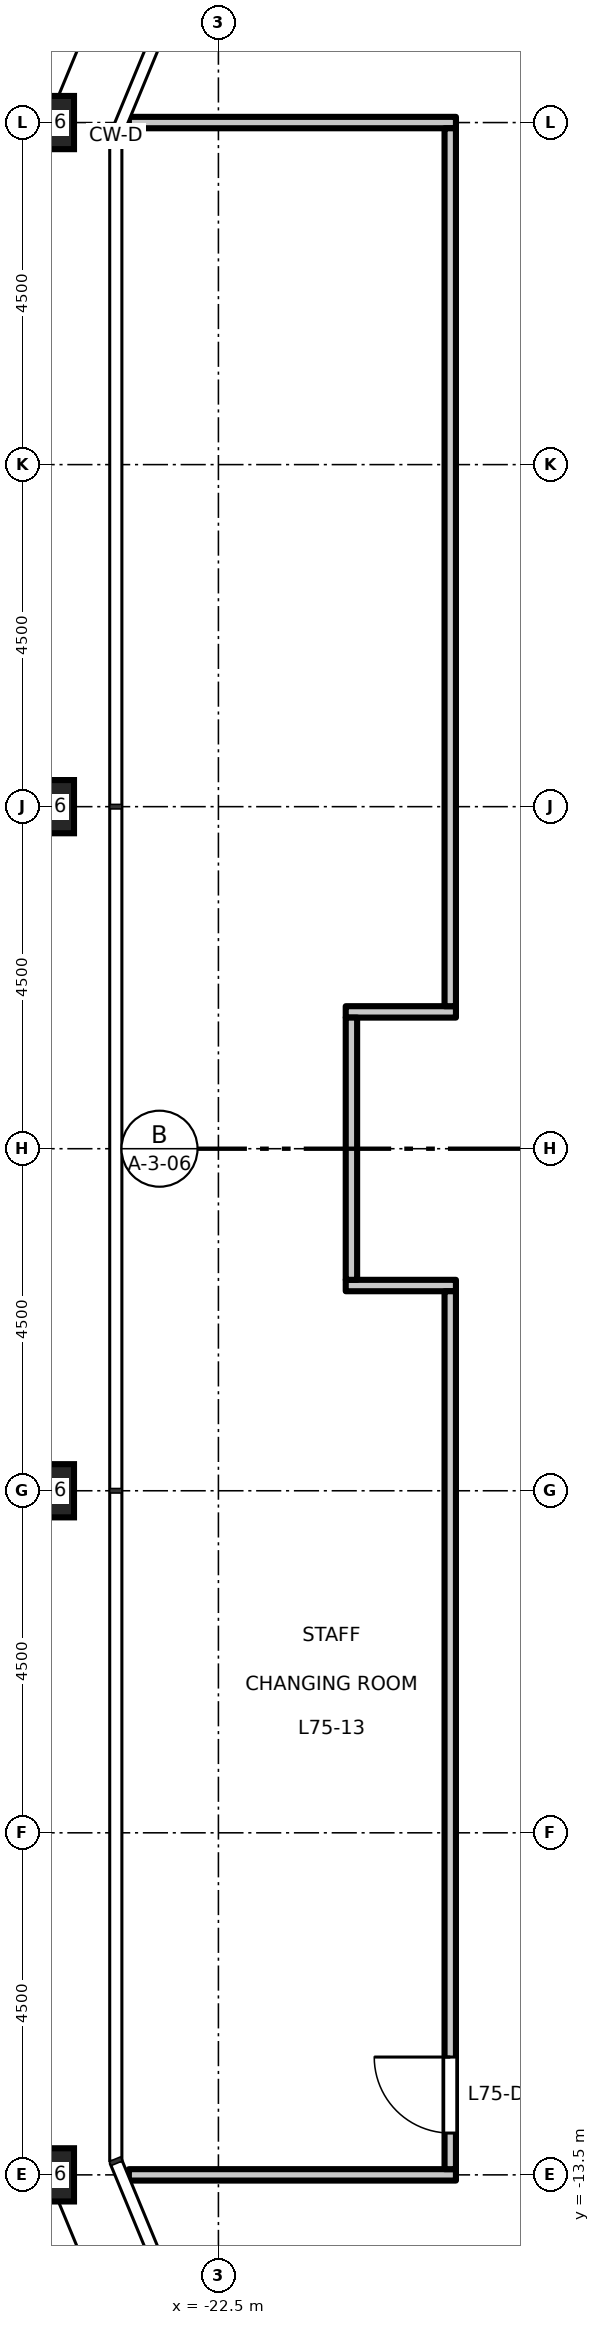
"""IFC4 building model, lengths in metres.
Left out: names, types, materials, properties, quantities, classifications, styles, units other than length and angle.
Written with IfcOpenShell. Run it as: python <this file> out.ifc"""

import sys

from ifc_helpers import new_model, si_unit, direction, frame, frame_2d, origin, origin_2d, place, context, subcontext, project, spatial, rectangle, hollow_rectangle, extrude, element, fill, save


model = new_model("IFC4")
c1 = context("Model", 3, precision=1e-05, world=origin(), true_north=direction((0.0, 1.0)))
c2 = subcontext(c1, "Body", "Model", "MODEL_VIEW")
j1 = project(units=[si_unit("LENGTHUNIT", "METRE"), si_unit("PLANEANGLEUNIT", "RADIAN")], contexts=[c1])
p1 = place(None, origin())
s1 = spatial("IfcSite", under=j1, at=p1, CompositionType="ELEMENT")
p2 = place(p1, origin())
s2 = spatial("IfcBuilding", under=s1, at=p2, CompositionType="ELEMENT")
p3 = place(p2, frame((0.0, 0.0, 348.2)))
s3 = spatial("IfcBuildingStorey", under=s2, at=p3, CompositionType="ELEMENT", Elevation=348.2)
for number, where, z_axis, x_axis in (
    (1, (-24.75, 13.5, 0.0), (0.0, 0.0, 1.0), (1.0, 0.0, 0.0)),
    (2, (-24.75, 4.5, 0.0), (0.0, 0.0, 1.0), (1.0, 0.0, 0.0)),
    (3, (-24.75, -4.5, 0.0), (0.0, 0.0, 1.0), (1.0, 0.0, 0.0)),
    (4, (-24.75, -13.5, 0.0), (0.0, 0.0, 1.0), (1.0, 0.0, 0.0)),
):
    element("IfcColumn", number, at=place(p3, frame(where, z_axis=z_axis, x_axis=x_axis)), inside=s3, PredefinedType="COLUMN", context=c2, shape_type="SweptSolid", body=[
        extrude(hollow_rectangle(XDim=0.7, YDim=0.7, WallThickness=0.036, at=origin_2d()), origin(), (0.0, 0.0, 1.0), 5.0),
    ])
p4 = place(p3, frame((-23.678, -13.5, 0.0), z_axis=(0.0, 0.0, 1.0), x_axis=(1.0, 0.0, 0.0)))
e5 = element("IfcWall", 5, at=p4, inside=s3, PredefinedType="PARTITIONING", context=c2, shape_type="SweptSolid", body=[
    extrude(rectangle(XDim=4.303, YDim=0.15, at=frame_2d((2.151, 0.0))), origin(), (0.0, 0.0, 1.0), 4.8),
])
for number, where, z_axis, x_axis in (
    (6, (-20.825, -1.8, 0.0), (0.0, 0.0, 1.0), (1.0, 0.0, 0.0)),
    (7, (-20.825, 1.8, 0.0), (0.0, 0.0, 1.0), (1.0, 0.0, 0.0)),
):
    element("IfcWall", number, at=place(p3, frame(where, z_axis=z_axis, x_axis=x_axis)), inside=s3, PredefinedType="PARTITIONING", context=c2, shape_type="SweptSolid", body=[
        extrude(rectangle(XDim=1.45, YDim=0.15, at=frame_2d((0.725, 0.0))), origin(), (0.0, 0.0, 1.0), 4.8),
    ])
p5 = place(p3, frame((-23.678, 13.5, 0.0), z_axis=(0.0, 0.0, 1.0), x_axis=(1.0, 0.0, 0.0)))
e8 = element("IfcWall", 8, at=p5, inside=s3, PredefinedType="PARTITIONING", context=c2, shape_type="SweptSolid", body=[
    extrude(rectangle(XDim=4.303, YDim=0.15, at=frame_2d((2.151, 0.0))), origin(), (0.0, 0.0, 1.0), 4.8),
])
p6 = place(p3, frame((-20.75, -1.725, 0.0), z_axis=(0.0, 0.0, 1.0), x_axis=(0.0, 1.0, 0.0)))
e9 = element("IfcWall", 9, at=p6, inside=s3, PredefinedType="PARTITIONING", context=c2, shape_type="SweptSolid", body=[
    extrude(rectangle(XDim=3.45, YDim=0.15, at=frame_2d((1.725, 0.0))), origin(), (0.0, 0.0, 1.0), 4.8),
])
p7 = place(p3, frame((-19.45, -13.425, 0.0), z_axis=(0.0, 0.0, 1.0), x_axis=(0.0, 1.0, 0.0)))
e10 = element("IfcWall", 10, at=p7, inside=s3, PredefinedType="PARTITIONING", context=c2, shape_type="SweptSolid", body=[
    extrude(rectangle(XDim=11.55, YDim=0.15, at=frame_2d((5.775, 0.0))), origin(), (0.0, 0.0, 1.0), 4.8),
])
p8 = place(p7, frame((0.475, 0.0, 0.0)))
e11 = element("IfcOpeningElement", 11, at=p8, cuts=e10, PredefinedType="OPENING", context=c2, shape_type="SweptSolid", body=[
    extrude(rectangle(XDim=1.0, YDim=2.1, at=frame_2d((0.5, 1.05))), frame((0.0, 0.085, 0.0), z_axis=(0.0, -1.0, 0.0), x_axis=(1.0, 0.0, 0.0)), (0.0, 0.0, 1.0), 0.17),
])
p9 = place(p3, frame((-19.45, 1.875, 0.0), z_axis=(0.0, 0.0, 1.0), x_axis=(0.0, 1.0, 0.0)))
e12 = element("IfcWall", 12, at=p9, inside=s3, PredefinedType="PARTITIONING", context=c2, shape_type="SweptSolid", body=[
    extrude(rectangle(XDim=11.55, YDim=0.15, at=frame_2d((5.775, 0.0))), origin(), (0.0, 0.0, 1.0), 4.8),
])
p10 = place(p8, origin())
e13 = element("IfcDoor", 13, at=p10, inside=s3, OperationType="SINGLE_SWING_RIGHT", PredefinedType="DOOR", context=c2, shape_type="SweptSolid", body=[
    extrude(rectangle(XDim=1.0, YDim=2.1, at=frame_2d((0.5, 1.05))), frame((0.0, 0.025, 0.0), z_axis=(0.0, -1.0, 0.0), x_axis=(1.0, 0.0, 0.0)), (0.0, 0.0, 1.0), 0.05),
])
fill(e11, e13)
save(model, sys.argv[1])
